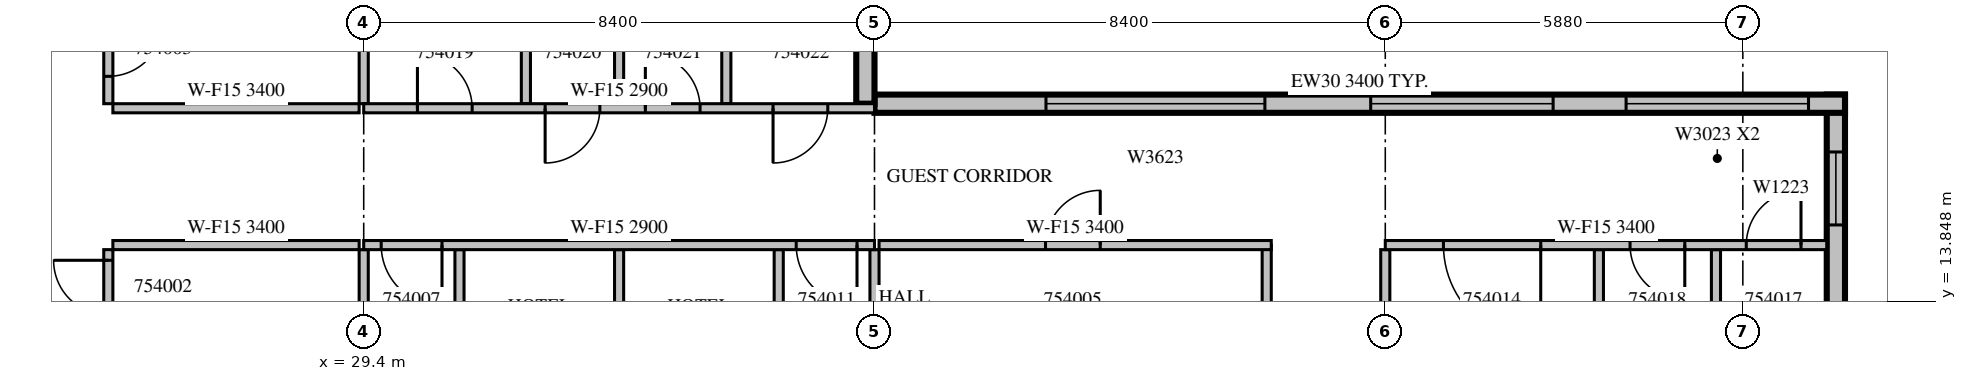
"""IFC4 building model, lengths in metres.
Left out: names, types, materials, properties, quantities, classifications, styles, units other than length and angle.
Written with IfcOpenShell. Run it as: python <this file> out.ifc"""

import sys

from ifc_helpers import new_model, si_unit, direction, frame, frame_2d, origin, place, context, subcontext, project, spatial, rectangle, extrude, source, transform, mapped, element, fill, save


model = new_model("IFC4")
c1 = context("Model", 3, precision=1e-05, world=origin(), true_north=direction((0.0, 1.0)))
c2 = subcontext(c1, "Body", "Model", "MODEL_VIEW")
j1 = project(units=[si_unit("LENGTHUNIT", "METRE"), si_unit("PLANEANGLEUNIT", "RADIAN")], contexts=[c1])
p1 = place(None, origin())
s1 = spatial("IfcSite", under=j1, at=p1, CompositionType="ELEMENT")
p2 = place(p1, origin())
s2 = spatial("IfcBuilding", under=s1, at=p2, CompositionType="ELEMENT")
p3 = place(p2, frame((0.0, 0.0, 238.6)))
s3 = spatial("IfcBuildingStorey", under=s2, at=p3, CompositionType="ELEMENT", Elevation=238.6)
m1 = source(origin(), c2, "Body", "SweptSolid", [
    extrude(rectangle(XDim=6.75, YDim=0.3, at=frame_2d((3.375, 0.0))), origin(), (0.0, 0.0, 1.0), 3.4),
])
p4 = place(p3, frame((53.61, 10.5, 0.0), z_axis=(0.0, 0.0, 1.0), x_axis=(0.0, 1.0, 0.0)))
e1 = element("IfcWall", 1, at=p4, inside=s3, PredefinedType="STANDARD", context=c2, shape_type="MappedRepresentation", body=[
    mapped(m1, transform((0.0, 0.0, 0.0), scale=1.0)),
])
m2 = source(origin(), c2, "Body", "SweptSolid", [
    extrude(rectangle(XDim=1.8, YDim=2.3, at=frame_2d((0.9, 1.15))), frame((0.0, 0.16, 0.0), z_axis=(0.0, -1.0, 0.0), x_axis=(1.0, 0.0, 0.0)), (0.0, 0.0, 1.0), 0.32),
])
p5 = place(p4, frame((0.787, 0.0, 0.6)))
e2 = element("IfcOpeningElement", 2, at=p5, cuts=e1, PredefinedType="OPENING", context=c2, shape_type="MappedRepresentation", body=[
    mapped(m2, transform((0.0, 0.0, 0.0), scale=1.0)),
])
m3 = source(origin(), c2, "Body", "SweptSolid", [
    extrude(rectangle(XDim=1.2, YDim=2.3, at=frame_2d((0.6, 1.15))), frame((0.0, 0.16, 0.0), z_axis=(0.0, -1.0, 0.0), x_axis=(1.0, 0.0, 0.0)), (0.0, 0.0, 1.0), 0.32),
])
p6 = place(p4, frame((4.606, 0.0, 0.6)))
e3 = element("IfcOpeningElement", 3, at=p6, cuts=e1, PredefinedType="OPENING", context=c2, shape_type="MappedRepresentation", body=[
    mapped(m3, transform((0.0, 0.0, 0.0), scale=1.0)),
])
m4 = source(origin(), c2, "Body", "SweptSolid", [
    extrude(rectangle(XDim=15.96, YDim=0.3, at=frame_2d((7.98, 0.0))), origin(), (0.0, 0.0, 1.0), 3.4),
])
p7 = place(p3, frame((53.76, 17.1, 0.0), z_axis=(0.0, 0.0, 1.0), x_axis=(-1.0, 0.0, 0.0)))
e4 = element("IfcWall", 4, at=p7, inside=s3, PredefinedType="STANDARD", context=c2, shape_type="MappedRepresentation", body=[
    mapped(m4, transform((0.0, 0.0, 0.0), scale=1.0)),
])
m5 = source(origin(), c2, "Body", "SweptSolid", [
    extrude(rectangle(XDim=3.0, YDim=2.3, at=frame_2d((1.5, 1.15))), frame((0.0, 0.16, 0.0), z_axis=(0.0, -1.0, 0.0), x_axis=(1.0, 0.0, 0.0)), (0.0, 0.0, 1.0), 0.32),
])
p8 = place(p7, frame((0.6, 0.0, 0.6)))
e5 = element("IfcOpeningElement", 5, at=p8, cuts=e4, PredefinedType="OPENING", context=c2, shape_type="MappedRepresentation", body=[
    mapped(m5, transform((0.0, 0.0, 0.0), scale=1.0)),
])
p9 = place(p7, frame((4.8, 0.0, 0.6)))
e6 = element("IfcOpeningElement", 6, at=p9, cuts=e4, PredefinedType="OPENING", context=c2, shape_type="MappedRepresentation", body=[
    mapped(m5, transform((0.0, 0.0, 0.0), scale=1.0)),
])
m6 = source(origin(), c2, "Body", "SweptSolid", [
    extrude(rectangle(XDim=3.6, YDim=2.3, at=frame_2d((1.8, 1.15))), frame((0.0, 0.16, 0.0), z_axis=(0.0, -1.0, 0.0), x_axis=(1.0, 0.0, 0.0)), (0.0, 0.0, 1.0), 0.32),
])
p10 = place(p7, frame((9.54, 0.0, 0.6)))
e7 = element("IfcOpeningElement", 7, at=p10, cuts=e4, PredefinedType="OPENING", context=c2, shape_type="MappedRepresentation", body=[
    mapped(m6, transform((0.0, 0.0, 0.0), scale=1.0)),
])
m7 = source(origin(), c2, "Body", "SweptSolid", [
    extrude(rectangle(XDim=3.1, YDim=0.3, at=frame_2d((1.55, 0.0))), origin(), (0.0, 0.0, 1.0), 3.4),
])
p11 = place(p3, frame((37.65, 17.1, 0.0), z_axis=(0.0, 0.0, 1.0), x_axis=(0.0, 1.0, 0.0)))
e8 = element("IfcWall", 8, at=p11, inside=s3, PredefinedType="STANDARD", context=c2, shape_type="MappedRepresentation", body=[
    mapped(m7, transform((0.0, 0.0, 0.0), scale=1.0)),
])
p12 = place(p11, frame((1.125, 0.0, 0.6)))
e9 = element("IfcOpeningElement", 9, at=p12, cuts=e8, PredefinedType="OPENING", context=c2, shape_type="MappedRepresentation", body=[
    mapped(m2, transform((0.0, 0.0, 0.0), scale=1.0)),
])
m8 = source(origin(), c2, "Body", "SweptSolid", [
    extrude(rectangle(XDim=11.225, YDim=0.15, at=frame_2d((5.612, 0.0))), origin(), (0.0, 0.0, 1.0), 2.4),
])
p13 = place(p3, frame((25.2, 14.7, 0.0), z_axis=(0.0, 0.0, 1.0), x_axis=(0.0, -1.0, 0.0)))
e10 = element("IfcWall", 10, at=p13, inside=s3, PredefinedType="PARTITIONING", context=c2, shape_type="MappedRepresentation", body=[
    mapped(m8, transform((0.0, 0.0, 0.0), scale=1.0)),
])
m9 = source(origin(), c2, "Body", "SweptSolid", [
    extrude(rectangle(XDim=0.9, YDim=2.1, at=frame_2d((0.45, 1.05))), frame((0.0, 0.085, 0.0), z_axis=(0.0, -1.0, 0.0), x_axis=(1.0, 0.0, 0.0)), (0.0, 0.0, 1.0), 0.17),
])
p14 = place(p13, frame((6.662, 0.0, 0.0)))
e11 = element("IfcOpeningElement", 11, at=p14, cuts=e10, PredefinedType="OPENING", context=c2, shape_type="MappedRepresentation", body=[
    mapped(m9, transform((0.0, 0.0, 0.0), scale=1.0)),
])
p15 = place(p13, frame((0.175, 0.0, 0.0)))
e12 = element("IfcOpeningElement", 12, at=p15, cuts=e10, PredefinedType="OPENING", context=c2, shape_type="MappedRepresentation", body=[
    mapped(m9, transform((0.0, 0.0, 0.0), scale=1.0)),
])
m10 = source(origin(), c2, "Body", "SweptSolid", [
    extrude(rectangle(XDim=3.6, YDim=0.15, at=frame_2d((1.8, 0.0))), origin(), (0.0, 0.0, 1.0), 3.4),
])
p16 = place(p3, frame((25.2, 20.7, 0.0), z_axis=(0.0, 0.0, 1.0), x_axis=(0.0, -1.0, 0.0)))
e13 = element("IfcWall", 13, at=p16, inside=s3, PredefinedType="PARTITIONING", context=c2, shape_type="MappedRepresentation", body=[
    mapped(m10, transform((0.0, 0.0, 0.0), scale=1.0)),
])
p17 = place(p16, frame((2.25, 0.0, 0.0)))
e14 = element("IfcOpeningElement", 14, at=p17, cuts=e13, PredefinedType="OPENING", context=c2, shape_type="MappedRepresentation", body=[
    mapped(m9, transform((0.0, 0.0, 0.0), scale=1.0)),
])
m11 = source(origin(), c2, "Body", "SweptSolid", [
    extrude(rectangle(XDim=4.05, YDim=0.15, at=frame_2d((2.025, 0.0))), origin(), (0.0, 0.0, 1.0), 3.4),
])
for number, where, z_axis, x_axis in (
    (15, (29.325, 14.775, 0.0), (0.0, 0.0, 1.0), (-1.0, 0.0, 0.0)),
    (16, (25.275, 17.025, 0.0), (0.0, 0.0, 1.0), (1.0, 0.0, 0.0)),
):
    element("IfcWall", number, at=place(p3, frame(where, z_axis=z_axis, x_axis=x_axis)), inside=s3, PredefinedType="PARTITIONING", context=c2, shape_type="MappedRepresentation", body=[
        mapped(m11, transform((0.0, 0.0, 0.0), scale=1.0)),
    ])
p18 = place(p3, frame((29.4, 10.899, 0.0), z_axis=(0.0, 0.0, 1.0), x_axis=(0.0, 1.0, 0.0)))
e17 = element("IfcWall", 17, at=p18, inside=s3, PredefinedType="PARTITIONING", context=c2, shape_type="SweptSolid", body=[
    extrude(rectangle(XDim=3.801, YDim=0.15, at=frame_2d((1.901, 0.0))), origin(), (0.0, 0.0, 1.0), 3.4),
])
m12 = source(origin(), c2, "Body", "SweptSolid", [
    extrude(rectangle(XDim=3.101, YDim=0.15, at=frame_2d((1.55, 0.0))), origin(), (0.0, 0.0, 1.0), 3.4),
])
p19 = place(p3, frame((29.4, 17.1, 0.0), z_axis=(0.0, 0.0, 1.0), x_axis=(0.0, 1.0, 0.0)))
e18 = element("IfcWall", 18, at=p19, inside=s3, PredefinedType="PARTITIONING", context=c2, shape_type="MappedRepresentation", body=[
    mapped(m12, transform((0.0, 0.0, 0.0), scale=1.0)),
])
p20 = place(p3, frame((44.25, 11.1, 0.0), z_axis=(0.0, 0.0, 1.0), x_axis=(0.0, 1.0, 0.0)))
e19 = element("IfcWall", 19, at=p20, inside=s3, PredefinedType="PARTITIONING", context=c2, shape_type="SweptSolid", body=[
    extrude(rectangle(XDim=3.675, YDim=0.15, at=frame_2d((1.837, 0.0))), origin(), (0.0, 0.0, 1.0), 3.4),
])
m13 = source(origin(), c2, "Body", "SweptSolid", [
    extrude(rectangle(XDim=6.45, YDim=0.15, at=frame_2d((3.225, 0.0))), origin(), (0.0, 0.0, 1.0), 3.4),
])
p21 = place(p3, frame((44.325, 14.775, 0.0), z_axis=(0.0, 0.0, 1.0), x_axis=(-1.0, 0.0, 0.0)))
e20 = element("IfcWall", 20, at=p21, inside=s3, PredefinedType="PARTITIONING", context=c2, shape_type="MappedRepresentation", body=[
    mapped(m13, transform((0.0, 0.0, 0.0), scale=1.0)),
])
p22 = place(p21, frame((2.812, 0.0, 0.0)))
e21 = element("IfcOpeningElement", 21, at=p22, cuts=e20, PredefinedType="OPENING", context=c2, shape_type="MappedRepresentation", body=[
    mapped(m9, transform((0.0, 0.0, 0.0), scale=1.0)),
])
p23 = place(p3, frame((30.975, 11.05, 0.0), z_axis=(0.0, 0.0, 1.0), x_axis=(0.0, 1.0, 0.0)))
e22 = element("IfcWall", 22, at=p23, inside=s3, PredefinedType="PARTITIONING", context=c2, shape_type="SweptSolid", body=[
    extrude(rectangle(XDim=3.65, YDim=0.15, at=frame_2d((1.825, 0.0))), origin(), (0.0, 0.0, 1.0), 3.4),
])
p24 = place(p3, frame((33.6, 11.05, 0.0), z_axis=(0.0, 0.0, 1.0), x_axis=(0.0, 1.0, 0.0)))
e23 = element("IfcWall", 23, at=p24, inside=s3, PredefinedType="PARTITIONING", context=c2, shape_type="SweptSolid", body=[
    extrude(rectangle(XDim=3.65, YDim=0.15, at=frame_2d((1.825, 0.0))), origin(), (0.0, 0.0, 1.0), 2.9),
])
m14 = source(origin(), c2, "Body", "SweptSolid", [
    extrude(rectangle(XDim=3.65, YDim=0.15, at=frame_2d((1.825, 0.0))), origin(), (0.0, 0.0, 1.0), 3.4),
])
for number, where, z_axis, x_axis in (
    (24, (36.225, 11.05, 0.0), (0.0, 0.0, 1.0), (0.0, 1.0, 0.0)),
    (25, (37.8, 11.05, 0.0), (0.0, 0.0, 1.0), (0.0, 1.0, 0.0)),
    (26, (49.713, 11.05, 0.0), (0.0, 0.0, 1.0), (0.0, 1.0, 0.0)),
    (27, (51.638, 11.05, 0.0), (0.0, 0.0, 1.0), (0.0, 1.0, 0.0)),
    (28, (46.2, 11.05, 0.0), (0.0, 0.0, 1.0), (0.0, 1.0, 0.0)),
):
    element("IfcWall", number, at=place(p3, frame(where, z_axis=z_axis, x_axis=x_axis)), inside=s3, PredefinedType="PARTITIONING", context=c2, shape_type="MappedRepresentation", body=[
        mapped(m14, transform((0.0, 0.0, 0.0), scale=1.0)),
    ])
m15 = source(origin(), c2, "Body", "SweptSolid", [
    extrude(rectangle(XDim=3.6, YDim=0.15, at=frame_2d((1.8, 0.0))), origin(), (0.0, 0.0, 1.0), 2.4),
])
for number, where, z_axis, x_axis in (
    (29, (32.067, 20.7, 0.0), (0.0, 0.0, 1.0), (0.0, -1.0, 0.0)),
    (30, (35.363, 20.7, 0.0), (0.0, 0.0, 1.0), (0.0, -1.0, 0.0)),
    (31, (33.6, 17.1, 0.0), (0.0, 0.0, 1.0), (0.0, 1.0, 0.0)),
):
    element("IfcWall", number, at=place(p3, frame(where, z_axis=z_axis, x_axis=x_axis)), inside=s3, PredefinedType="PARTITIONING", context=c2, shape_type="MappedRepresentation", body=[
        mapped(m15, transform((0.0, 0.0, 0.0), scale=1.0)),
    ])
m16 = source(origin(), c2, "Body", "SweptSolid", [
    extrude(rectangle(XDim=8.4, YDim=0.15, at=frame_2d((4.2, 0.0))), origin(), (0.0, 0.0, 1.0), 2.9),
])
p25 = place(p3, frame((37.8, 14.775, 0.0), z_axis=(0.0, 0.0, 1.0), x_axis=(-1.0, 0.0, 0.0)))
e32 = element("IfcWall", 32, at=p25, inside=s3, PredefinedType="PARTITIONING", context=c2, shape_type="MappedRepresentation", body=[
    mapped(m16, transform((0.0, 0.0, 0.0), scale=1.0)),
])
m17 = source(origin(), c2, "Body", "SweptSolid", [
    extrude(rectangle(XDim=1.0, YDim=2.1, at=frame_2d((0.5, 1.05))), frame((0.0, 0.085, 0.0), z_axis=(0.0, -1.0, 0.0), x_axis=(1.0, 0.0, 0.0)), (0.0, 0.0, 1.0), 0.17),
])
p26 = place(p25, frame((7.112, 0.0, 0.0)))
e33 = element("IfcOpeningElement", 33, at=p26, cuts=e32, PredefinedType="OPENING", context=c2, shape_type="MappedRepresentation", body=[
    mapped(m17, transform((0.0, 0.0, 0.0), scale=1.0)),
])
p27 = place(p25, frame((0.287, 0.0, 0.0)))
e34 = element("IfcOpeningElement", 34, at=p27, cuts=e32, PredefinedType="OPENING", context=c2, shape_type="MappedRepresentation", body=[
    mapped(m17, transform((0.0, 0.0, 0.0), scale=1.0)),
])
m18 = source(origin(), c2, "Body", "SweptSolid", [
    extrude(rectangle(XDim=7.26, YDim=0.15, at=frame_2d((3.63, 0.0))), origin(), (0.0, 0.0, 1.0), 3.4),
])
p28 = place(p3, frame((53.46, 14.775, 0.0), z_axis=(0.0, 0.0, 1.0), x_axis=(-1.0, 0.0, 0.0)))
e35 = element("IfcWall", 35, at=p28, inside=s3, PredefinedType="PARTITIONING", context=c2, shape_type="MappedRepresentation", body=[
    mapped(m18, transform((0.0, 0.0, 0.0), scale=1.0)),
])
m19 = source(origin(), c2, "Body", "SweptSolid", [
    extrude(rectangle(XDim=1.6, YDim=2.1, at=frame_2d((0.8, 1.05))), frame((0.0, 0.085, 0.0), z_axis=(0.0, -1.0, 0.0), x_axis=(1.0, 0.0, 0.0)), (0.0, 0.0, 1.0), 0.17),
])
p29 = place(p28, frame((4.704, 0.0, 0.0)))
e36 = element("IfcOpeningElement", 36, at=p29, cuts=e35, PredefinedType="OPENING", context=c2, shape_type="MappedRepresentation", body=[
    mapped(m19, transform((0.0, 0.0, 0.0), scale=1.0)),
])
p30 = place(p28, frame((0.423, 0.0, 0.0)))
e37 = element("IfcOpeningElement", 37, at=p30, cuts=e35, PredefinedType="OPENING", context=c2, shape_type="MappedRepresentation", body=[
    mapped(m9, transform((0.0, 0.0, 0.0), scale=1.0)),
])
p31 = place(p28, frame((2.335, 0.0, 0.0)))
e38 = element("IfcOpeningElement", 38, at=p31, cuts=e35, PredefinedType="OPENING", context=c2, shape_type="MappedRepresentation", body=[
    mapped(m9, transform((0.0, 0.0, 0.0), scale=1.0)),
])
p32 = place(p3, frame((29.4, 17.025, 0.0), z_axis=(0.0, 0.0, 1.0), x_axis=(1.0, 0.0, 0.0)))
e39 = element("IfcWall", 39, at=p32, inside=s3, PredefinedType="PARTITIONING", context=c2, shape_type="MappedRepresentation", body=[
    mapped(m16, transform((0.0, 0.0, 0.0), scale=1.0)),
])
p33 = place(p32, frame((0.883, 0.0, 0.0)))
e40 = element("IfcOpeningElement", 40, at=p33, cuts=e39, PredefinedType="OPENING", context=c2, shape_type="MappedRepresentation", body=[
    mapped(m9, transform((0.0, 0.0, 0.0), scale=1.0)),
])
p34 = place(p32, frame((2.983, 0.0, 0.0)))
e41 = element("IfcOpeningElement", 41, at=p34, cuts=e39, PredefinedType="OPENING", context=c2, shape_type="MappedRepresentation", body=[
    mapped(m9, transform((0.0, 0.0, 0.0), scale=1.0)),
])
p35 = place(p32, frame((4.632, 0.0, 0.0)))
e42 = element("IfcOpeningElement", 42, at=p35, cuts=e39, PredefinedType="OPENING", context=c2, shape_type="MappedRepresentation", body=[
    mapped(m9, transform((0.0, 0.0, 0.0), scale=1.0)),
])
p36 = place(p32, frame((6.732, 0.0, 0.0)))
e43 = element("IfcOpeningElement", 43, at=p36, cuts=e39, PredefinedType="OPENING", context=c2, shape_type="MappedRepresentation", body=[
    mapped(m9, transform((0.0, 0.0, 0.0), scale=1.0)),
])
m20 = source(origin(), c2, "Body", "SweptSolid", [
    extrude(rectangle(XDim=1.2, YDim=2.3, at=frame_2d((0.6, 1.15))), frame((0.0, 0.03, 0.0), z_axis=(0.0, -1.0, 0.0), x_axis=(1.0, 0.0, 0.0)), (0.0, 0.0, 1.0), 0.06),
])
p37 = place(p6, origin())
e44 = element("IfcWindow", 44, at=p37, inside=s3, PartitioningType="SINGLE_PANEL", PredefinedType="WINDOW", context=c2, shape_type="MappedRepresentation", body=[
    mapped(m20, transform((0.0, 0.0, 0.0), scale=1.0)),
])
fill(e3, e44)
m21 = source(origin(), c2, "Body", "SweptSolid", [
    extrude(rectangle(XDim=3.0, YDim=2.3, at=frame_2d((1.5, 1.15))), frame((0.0, 0.03, 0.0), z_axis=(0.0, -1.0, 0.0), x_axis=(1.0, 0.0, 0.0)), (0.0, 0.0, 1.0), 0.06),
])
p38 = place(p8, origin())
e45 = element("IfcWindow", 45, at=p38, inside=s3, PartitioningType="SINGLE_PANEL", PredefinedType="WINDOW", context=c2, shape_type="MappedRepresentation", body=[
    mapped(m21, transform((0.0, 0.0, 0.0), scale=1.0)),
])
fill(e5, e45)
p39 = place(p9, origin())
e46 = element("IfcWindow", 46, at=p39, inside=s3, PartitioningType="SINGLE_PANEL", PredefinedType="WINDOW", context=c2, shape_type="MappedRepresentation", body=[
    mapped(m21, transform((0.0, 0.0, 0.0), scale=1.0)),
])
fill(e6, e46)
m22 = source(origin(), c2, "Body", "SweptSolid", [
    extrude(rectangle(XDim=3.6, YDim=2.3, at=frame_2d((1.8, 1.15))), frame((0.0, 0.03, 0.0), z_axis=(0.0, -1.0, 0.0), x_axis=(1.0, 0.0, 0.0)), (0.0, 0.0, 1.0), 0.06),
])
p40 = place(p10, origin())
e47 = element("IfcWindow", 47, at=p40, inside=s3, PartitioningType="SINGLE_PANEL", PredefinedType="WINDOW", context=c2, shape_type="MappedRepresentation", body=[
    mapped(m22, transform((0.0, 0.0, 0.0), scale=1.0)),
])
fill(e7, e47)
m23 = source(origin(), c2, "Body", "SweptSolid", [
    extrude(rectangle(XDim=0.9, YDim=2.1, at=frame_2d((0.45, 1.05))), frame((0.0, 0.025, 0.0), z_axis=(0.0, -1.0, 0.0), x_axis=(1.0, 0.0, 0.0)), (0.0, 0.0, 1.0), 0.05),
])
p41 = place(p15, origin())
e48 = element("IfcDoor", 48, at=p41, inside=s3, OperationType="SINGLE_SWING_RIGHT", PredefinedType="DOOR", context=c2, shape_type="MappedRepresentation", body=[
    mapped(m23, transform((0.0, 0.0, 0.0), scale=1.0)),
])
fill(e12, e48)
p42 = place(p17, origin())
e49 = element("IfcDoor", 49, at=p42, inside=s3, OperationType="SINGLE_SWING_LEFT", PredefinedType="DOOR", context=c2, shape_type="MappedRepresentation", body=[
    mapped(m23, transform((0.0, 0.0, 0.0), scale=1.0)),
])
fill(e14, e49)
p43 = place(p22, origin())
e50 = element("IfcDoor", 50, at=p43, inside=s3, OperationType="SINGLE_SWING_RIGHT", PredefinedType="DOOR", context=c2, shape_type="MappedRepresentation", body=[
    mapped(m23, transform((0.0, 0.0, 0.0), scale=1.0)),
])
fill(e21, e50)
m24 = source(origin(), c2, "Body", "SweptSolid", [
    extrude(rectangle(XDim=1.0, YDim=2.1, at=frame_2d((0.5, 1.05))), frame((0.0, 0.025, 0.0), z_axis=(0.0, -1.0, 0.0), x_axis=(1.0, 0.0, 0.0)), (0.0, 0.0, 1.0), 0.05),
])
p44 = place(p26, origin())
e51 = element("IfcDoor", 51, at=p44, inside=s3, OperationType="SINGLE_SWING_LEFT", PredefinedType="DOOR", context=c2, shape_type="MappedRepresentation", body=[
    mapped(m24, transform((0.0, 0.0, 0.0), scale=1.0)),
])
fill(e33, e51)
p45 = place(p27, origin())
e52 = element("IfcDoor", 52, at=p45, inside=s3, OperationType="SINGLE_SWING_LEFT", PredefinedType="DOOR", context=c2, shape_type="MappedRepresentation", body=[
    mapped(m24, transform((0.0, 0.0, 0.0), scale=1.0)),
])
fill(e34, e52)
m25 = source(origin(), c2, "Body", "SweptSolid", [
    extrude(rectangle(XDim=1.6, YDim=2.1, at=frame_2d((0.8, 1.05))), frame((0.0, 0.025, 0.0), z_axis=(0.0, -1.0, 0.0), x_axis=(1.0, 0.0, 0.0)), (0.0, 0.0, 1.0), 0.05),
])
p46 = place(p29, origin())
e53 = element("IfcDoor", 53, at=p46, inside=s3, OperationType="SINGLE_SWING_LEFT", PredefinedType="DOOR", context=c2, shape_type="MappedRepresentation", body=[
    mapped(m25, transform((0.0, 0.0, 0.0), scale=1.0)),
])
fill(e36, e53)
p47 = place(p30, origin())
e54 = element("IfcDoor", 54, at=p47, inside=s3, OperationType="SINGLE_SWING_RIGHT", PredefinedType="DOOR", context=c2, shape_type="MappedRepresentation", body=[
    mapped(m23, transform((0.0, 0.0, 0.0), scale=1.0)),
])
fill(e37, e54)
p48 = place(p31, origin())
e55 = element("IfcDoor", 55, at=p48, inside=s3, OperationType="SINGLE_SWING_LEFT", PredefinedType="DOOR", context=c2, shape_type="MappedRepresentation", body=[
    mapped(m23, transform((0.0, 0.0, 0.0), scale=1.0)),
])
fill(e38, e55)
p49 = place(p33, origin())
e56 = element("IfcDoor", 56, at=p49, inside=s3, OperationType="SINGLE_SWING_LEFT", PredefinedType="DOOR", context=c2, shape_type="MappedRepresentation", body=[
    mapped(m23, transform((0.0, 0.0, 0.0), scale=1.0)),
])
fill(e40, e56)
p50 = place(p34, origin())
e57 = element("IfcDoor", 57, at=p50, inside=s3, OperationType="SINGLE_SWING_RIGHT", PredefinedType="DOOR", context=c2, shape_type="MappedRepresentation", body=[
    mapped(m23, transform((0.0, 0.0, 0.0), scale=1.0)),
])
fill(e41, e57)
p51 = place(p35, origin())
e58 = element("IfcDoor", 58, at=p51, inside=s3, OperationType="SINGLE_SWING_LEFT", PredefinedType="DOOR", context=c2, shape_type="MappedRepresentation", body=[
    mapped(m23, transform((0.0, 0.0, 0.0), scale=1.0)),
])
fill(e42, e58)
p52 = place(p36, origin())
e59 = element("IfcDoor", 59, at=p52, inside=s3, OperationType="SINGLE_SWING_RIGHT", PredefinedType="DOOR", context=c2, shape_type="MappedRepresentation", body=[
    mapped(m23, transform((0.0, 0.0, 0.0), scale=1.0)),
])
fill(e43, e59)
save(model, sys.argv[1])
